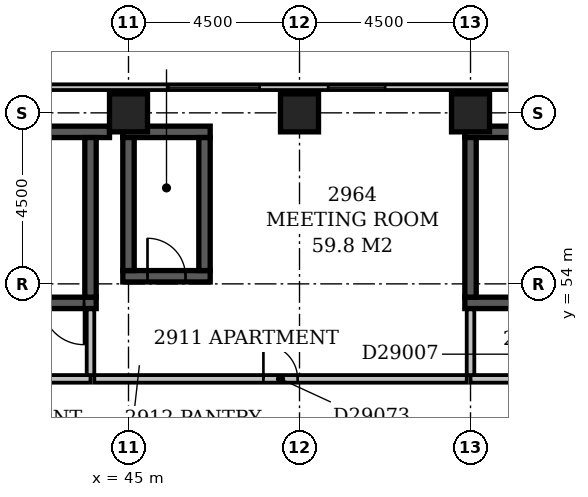
"""IFC4 building model, lengths in metres.
Left out: names, types, materials, properties, quantities, classifications, styles, units other than length and angle.
Written with IfcOpenShell. Run it as: python <this file> out.ifc"""

import sys

from ifc_helpers import new_model, si_unit, direction, frame, frame_2d, origin, origin_2d, place, context, subcontext, project, spatial, rectangle, extrude, element, fill, save


model = new_model("IFC4")
c1 = context("Model", 3, precision=1e-05, world=origin(), true_north=direction((0.0, 1.0)))
c2 = subcontext(c1, "Body", "Model", "MODEL_VIEW")
j1 = project(units=[si_unit("LENGTHUNIT", "METRE"), si_unit("PLANEANGLEUNIT", "RADIAN")], contexts=[c1])
p1 = place(None, origin())
s1 = spatial("IfcSite", under=j1, at=p1, CompositionType="ELEMENT")
p2 = place(p1, origin())
s2 = spatial("IfcBuilding", under=s1, at=p2, CompositionType="ELEMENT")
p3 = place(p2, frame((0.0, 0.0, 119.6)))
s3 = spatial("IfcBuildingStorey", under=s2, at=p3, CompositionType="ELEMENT", Elevation=119.6)
p4 = place(p3, frame((37.15, 53.5, -0.3), z_axis=(0.0, 0.0, 1.0), x_axis=(1.0, 0.0, 0.0)))
e1 = element("IfcWall", 1, at=p4, inside=s3, PredefinedType="SHEAR", context=c2, shape_type="SweptSolid", body=[
    extrude(rectangle(XDim=7.0, YDim=0.3, at=frame_2d((3.5, 0.0))), origin(), (0.0, 0.0, 1.0), 3.6),
])
p5 = place(p4, frame((5.58, 0.0, 0.3)))
e2 = element("IfcOpeningElement", 2, at=p5, cuts=e1, PredefinedType="OPENING", context=c2, shape_type="SweptSolid", body=[
    extrude(rectangle(XDim=1.1, YDim=2.1, at=frame_2d((0.55, 1.05))), frame((0.0, 0.162, 0.0), z_axis=(0.0, -1.0, 0.0), x_axis=(1.0, 0.0, 0.0)), (0.0, 0.0, 1.0), 0.324),
])
p6 = place(p3, frame((37.15, 58.0, -0.3), z_axis=(0.0, 0.0, 1.0), x_axis=(1.0, 0.0, 0.0)))
e3 = element("IfcWall", 3, at=p6, inside=s3, PredefinedType="SHEAR", context=c2, shape_type="SweptSolid", body=[
    extrude(rectangle(XDim=7.35, YDim=0.3, at=frame_2d((3.675, 0.0))), origin(), (0.0, 0.0, 1.0), 3.6),
])
p7 = place(p3, frame((44.0, 53.65, -0.3), z_axis=(0.0, 0.0, 1.0), x_axis=(0.0, 1.0, 0.0)))
e4 = element("IfcWall", 4, at=p7, inside=s3, PredefinedType="SHEAR", context=c2, shape_type="SweptSolid", body=[
    extrude(rectangle(XDim=4.2, YDim=0.3, at=frame_2d((2.1, 0.0))), origin(), (0.0, 0.0, 1.0), 3.6),
])
p8 = place(p3, frame((44.85, 54.2, -0.3), z_axis=(0.0, 0.0, 1.0), x_axis=(1.0, 0.0, 0.0)))
e5 = element("IfcWall", 5, at=p8, inside=s3, PredefinedType="SHEAR", context=c2, shape_type="SweptSolid", body=[
    extrude(rectangle(XDim=2.3, YDim=0.3, at=frame_2d((1.15, 0.0))), origin(), (0.0, 0.0, 1.0), 3.6),
])
p9 = place(p8, frame((0.65, 0.0, 0.3)))
e6 = element("IfcOpeningElement", 6, at=p9, cuts=e5, PredefinedType="OPENING", context=c2, shape_type="SweptSolid", body=[
    extrude(rectangle(XDim=1.0, YDim=2.1, at=frame_2d((0.5, 1.05))), frame((0.0, 0.162, 0.0), z_axis=(0.0, -1.0, 0.0), x_axis=(1.0, 0.0, 0.0)), (0.0, 0.0, 1.0), 0.324),
])
p10 = place(p3, frame((44.85, 58.0, -0.3), z_axis=(0.0, 0.0, 1.0), x_axis=(1.0, 0.0, 0.0)))
e7 = element("IfcWall", 7, at=p10, inside=s3, PredefinedType="SHEAR", context=c2, shape_type="SweptSolid", body=[
    extrude(rectangle(XDim=2.3, YDim=0.3, at=frame_2d((1.15, 0.0))), origin(), (0.0, 0.0, 1.0), 3.6),
])
for number, where, z_axis, x_axis in (
    (8, (45.0, 54.35, -0.3), (0.0, 0.0, 1.0), (0.0, 1.0, 0.0)),
    (9, (47.0, 54.35, -0.3), (0.0, 0.0, 1.0), (0.0, 1.0, 0.0)),
):
    element("IfcWall", number, at=place(p3, frame(where, z_axis=z_axis, x_axis=x_axis)), inside=s3, PredefinedType="SHEAR", context=c2, shape_type="SweptSolid", body=[
        extrude(rectangle(XDim=3.5, YDim=0.3, at=frame_2d((1.75, 0.0))), origin(), (0.0, 0.0, 1.0), 3.6),
    ])
p11 = place(p3, frame((53.85, 53.5, -0.3), z_axis=(0.0, 0.0, 1.0), x_axis=(1.0, 0.0, 0.0)))
e10 = element("IfcWall", 10, at=p11, inside=s3, PredefinedType="SHEAR", context=c2, shape_type="SweptSolid", body=[
    extrude(rectangle(XDim=7.0, YDim=0.3, at=frame_2d((3.5, 0.0))), origin(), (0.0, 0.0, 1.0), 3.6),
])
p12 = place(p11, frame((5.58, 0.0, 0.3)))
e11 = element("IfcOpeningElement", 11, at=p12, cuts=e10, PredefinedType="OPENING", context=c2, shape_type="SweptSolid", body=[
    extrude(rectangle(XDim=1.1, YDim=2.1, at=frame_2d((0.55, 1.05))), frame((0.0, 0.162, 0.0), z_axis=(0.0, -1.0, 0.0), x_axis=(1.0, 0.0, 0.0)), (0.0, 0.0, 1.0), 0.324),
])
p13 = place(p3, frame((53.85, 58.0, -0.3), z_axis=(0.0, 0.0, 1.0), x_axis=(1.0, 0.0, 0.0)))
e12 = element("IfcWall", 12, at=p13, inside=s3, PredefinedType="SHEAR", context=c2, shape_type="SweptSolid", body=[
    extrude(rectangle(XDim=7.0, YDim=0.3, at=frame_2d((3.5, 0.0))), origin(), (0.0, 0.0, 1.0), 3.6),
])
p14 = place(p3, frame((54.0, 53.65, -0.3), z_axis=(0.0, 0.0, 1.0), x_axis=(0.0, 1.0, 0.0)))
e13 = element("IfcWall", 13, at=p14, inside=s3, PredefinedType="SHEAR", context=c2, shape_type="SweptSolid", body=[
    extrude(rectangle(XDim=4.2, YDim=0.3, at=frame_2d((2.1, 0.0))), origin(), (0.0, 0.0, 1.0), 3.6),
])
for number, where, z_axis, x_axis in (
    (14, (45.0, 58.5, -0.3), (0.0, 0.0, 1.0), (1.0, 0.0, 0.0)),
    (15, (49.5, 58.5, -0.3), (0.0, 0.0, 1.0), (1.0, 0.0, 0.0)),
    (16, (54.0, 58.5, -0.3), (0.0, 0.0, 1.0), (1.0, 0.0, 0.0)),
):
    element("IfcColumn", number, at=place(p3, frame(where, z_axis=z_axis, x_axis=x_axis)), inside=s3, PredefinedType="COLUMN", context=c2, shape_type="SweptSolid", body=[
        extrude(rectangle(XDim=1.0, YDim=1.0, at=origin_2d()), origin(), (0.0, 0.0, 1.0), 3.6),
    ])
p15 = place(p3, frame((68.1, 59.175, 0.0), z_axis=(0.0, 0.0, 1.0), x_axis=(-1.0, 0.0, 0.0)))
e17 = element("IfcWall", 17, at=p15, inside=s3, PredefinedType="STANDARD", context=c2, shape_type="SweptSolid", body=[
    extrude(rectangle(XDim=68.85, YDim=0.15, at=frame_2d((34.425, 0.0))), origin(), (0.0, 0.0, 1.0), 2.7),
])
p16 = place(p15, frame((1.65, 0.0, 0.6)))
e18 = element("IfcOpeningElement", 18, at=p16, cuts=e17, PredefinedType="OPENING", context=c2, shape_type="SweptSolid", body=[
    extrude(rectangle(XDim=2.4, YDim=1.8, at=frame_2d((1.2, 0.9))), frame((0.0, 0.087, 0.0), z_axis=(0.0, -1.0, 0.0), x_axis=(1.0, 0.0, 0.0)), (0.0, 0.0, 1.0), 0.174),
])
p17 = place(p15, frame((6.15, 0.0, 0.6)))
e19 = element("IfcOpeningElement", 19, at=p17, cuts=e17, PredefinedType="OPENING", context=c2, shape_type="SweptSolid", body=[
    extrude(rectangle(XDim=2.4, YDim=1.8, at=frame_2d((1.2, 0.9))), frame((0.0, 0.087, 0.0), z_axis=(0.0, -1.0, 0.0), x_axis=(1.0, 0.0, 0.0)), (0.0, 0.0, 1.0), 0.174),
])
p18 = place(p15, frame((16.347, 0.0, 0.6)))
e20 = element("IfcOpeningElement", 20, at=p18, cuts=e17, PredefinedType="OPENING", context=c2, shape_type="SweptSolid", body=[
    extrude(rectangle(XDim=1.5, YDim=1.8, at=frame_2d((0.75, 0.9))), frame((0.0, 0.087, 0.0), z_axis=(0.0, -1.0, 0.0), x_axis=(1.0, 0.0, 0.0)), (0.0, 0.0, 1.0), 0.174),
])
p19 = place(p15, frame((19.65, 0.0, 0.6)))
e21 = element("IfcOpeningElement", 21, at=p19, cuts=e17, PredefinedType="OPENING", context=c2, shape_type="SweptSolid", body=[
    extrude(rectangle(XDim=2.4, YDim=1.8, at=frame_2d((1.2, 0.9))), frame((0.0, 0.087, 0.0), z_axis=(0.0, -1.0, 0.0), x_axis=(1.0, 0.0, 0.0)), (0.0, 0.0, 1.0), 0.174),
])
p20 = place(p15, frame((37.678, 0.0, 0.6)))
e22 = element("IfcOpeningElement", 22, at=p20, cuts=e17, PredefinedType="OPENING", context=c2, shape_type="SweptSolid", body=[
    extrude(rectangle(XDim=1.2, YDim=1.8, at=frame_2d((0.6, 0.9))), frame((0.0, 0.087, 0.0), z_axis=(0.0, -1.0, 0.0), x_axis=(1.0, 0.0, 0.0)), (0.0, 0.0, 1.0), 0.174),
])
p21 = place(p3, frame((37.3, 51.5, 0.0), z_axis=(0.0, 0.0, 1.0), x_axis=(1.0, 0.0, 0.0)))
e23 = element("IfcWall", 23, at=p21, inside=s3, PredefinedType="PARTITIONING", context=c2, shape_type="SweptSolid", body=[
    extrude(rectangle(XDim=6.7, YDim=0.2, at=frame_2d((3.35, 0.0))), origin(), (0.0, 0.0, 1.0), 3.3),
])
p22 = place(p21, frame((2.75, 0.0, 0.0)))
e24 = element("IfcOpeningElement", 24, at=p22, cuts=e23, PredefinedType="OPENING", context=c2, shape_type="SweptSolid", body=[
    extrude(rectangle(XDim=1.2, YDim=2.1, at=frame_2d((0.6, 1.05))), frame((0.0, 0.112, 0.0), z_axis=(0.0, -1.0, 0.0), x_axis=(1.0, 0.0, 0.0)), (0.0, 0.0, 1.0), 0.224),
])
p23 = place(p3, frame((44.0, 51.6, 0.0), z_axis=(0.0, 0.0, 1.0), x_axis=(0.0, 1.0, 0.0)))
e25 = element("IfcWall", 25, at=p23, inside=s3, PredefinedType="PARTITIONING", context=c2, shape_type="SweptSolid", body=[
    extrude(rectangle(XDim=1.73, YDim=0.2, at=frame_2d((0.865, 0.0))), origin(), (0.0, 0.0, 1.0), 3.3),
])
p24 = place(p3, frame((54.0, 51.5, 0.0), z_axis=(0.0, 0.0, 1.0), x_axis=(1.0, 0.0, 0.0)))
e26 = element("IfcWall", 26, at=p24, inside=s3, PredefinedType="PARTITIONING", context=c2, shape_type="SweptSolid", body=[
    extrude(rectangle(XDim=6.7, YDim=0.2, at=frame_2d((3.35, 0.0))), origin(), (0.0, 0.0, 1.0), 3.3),
])
p25 = place(p24, frame((2.75, 0.0, 0.0)))
e27 = element("IfcOpeningElement", 27, at=p25, cuts=e26, PredefinedType="OPENING", context=c2, shape_type="SweptSolid", body=[
    extrude(rectangle(XDim=1.2, YDim=2.1, at=frame_2d((0.6, 1.05))), frame((0.0, 0.112, 0.0), z_axis=(0.0, -1.0, 0.0), x_axis=(1.0, 0.0, 0.0)), (0.0, 0.0, 1.0), 0.224),
])
p26 = place(p3, frame((54.0, 51.6, 0.0), z_axis=(0.0, 0.0, 1.0), x_axis=(0.0, 1.0, 0.0)))
e28 = element("IfcWall", 28, at=p26, inside=s3, PredefinedType="PARTITIONING", context=c2, shape_type="SweptSolid", body=[
    extrude(rectangle(XDim=1.73, YDim=0.2, at=frame_2d((0.865, 0.0))), origin(), (0.0, 0.0, 1.0), 2.6),
])
p27 = place(p3, frame((44.1, 51.5, 0.0), z_axis=(0.0, 0.0, 1.0), x_axis=(1.0, 0.0, 0.0)))
e29 = element("IfcWall", 29, at=p27, inside=s3, PredefinedType="PARTITIONING", context=c2, shape_type="SweptSolid", body=[
    extrude(rectangle(XDim=9.8, YDim=0.2, at=frame_2d((4.9, 0.0))), origin(), (0.0, 0.0, 1.0), 3.3),
])
p28 = place(p27, frame((4.45, 0.0, 0.0)))
e30 = element("IfcOpeningElement", 30, at=p28, cuts=e29, PredefinedType="OPENING", context=c2, shape_type="SweptSolid", body=[
    extrude(rectangle(XDim=0.9, YDim=2.1, at=frame_2d((0.45, 1.05))), frame((0.0, 0.112, 0.0), z_axis=(0.0, -1.0, 0.0), x_axis=(1.0, 0.0, 0.0)), (0.0, 0.0, 1.0), 0.224),
])
p29 = place(p18, origin())
e31 = element("IfcWindow", 31, at=p29, inside=s3, PartitioningType="SINGLE_PANEL", PredefinedType="WINDOW", context=c2, shape_type="SweptSolid", body=[
    extrude(rectangle(XDim=1.5, YDim=1.8, at=frame_2d((0.75, 0.9))), frame((0.0, 0.03, 0.0), z_axis=(0.0, -1.0, 0.0), x_axis=(1.0, 0.0, 0.0)), (0.0, 0.0, 1.0), 0.06),
])
fill(e20, e31)
p30 = place(p19, origin())
e32 = element("IfcWindow", 32, at=p30, inside=s3, PartitioningType="SINGLE_PANEL", PredefinedType="WINDOW", context=c2, shape_type="SweptSolid", body=[
    extrude(rectangle(XDim=2.4, YDim=1.8, at=frame_2d((1.2, 0.9))), frame((0.0, 0.03, 0.0), z_axis=(0.0, -1.0, 0.0), x_axis=(1.0, 0.0, 0.0)), (0.0, 0.0, 1.0), 0.06),
])
fill(e21, e32)
p31 = place(p9, origin())
e33 = element("IfcDoor", 33, at=p31, inside=s3, OperationType="SINGLE_SWING_LEFT", PredefinedType="DOOR", context=c2, shape_type="SweptSolid", body=[
    extrude(rectangle(XDim=1.0, YDim=2.1, at=frame_2d((0.5, 1.05))), frame((0.0, 0.025, 0.0), z_axis=(0.0, -1.0, 0.0), x_axis=(1.0, 0.0, 0.0)), (0.0, 0.0, 1.0), 0.05),
])
fill(e6, e33)
p32 = place(p5, origin())
e34 = element("IfcDoor", 34, at=p32, inside=s3, OperationType="SINGLE_SWING_RIGHT", PredefinedType="DOOR", context=c2, shape_type="SweptSolid", body=[
    extrude(rectangle(XDim=1.1, YDim=2.1, at=frame_2d((0.55, 1.05))), frame((0.0, 0.025, 0.0), z_axis=(0.0, -1.0, 0.0), x_axis=(1.0, 0.0, 0.0)), (0.0, 0.0, 1.0), 0.05),
])
fill(e2, e34)
p33 = place(p28, origin())
e35 = element("IfcDoor", 35, at=p33, inside=s3, OperationType="SINGLE_SWING_LEFT", PredefinedType="DOOR", context=c2, shape_type="SweptSolid", body=[
    extrude(rectangle(XDim=0.9, YDim=2.1, at=frame_2d((0.45, 1.05))), frame((0.0, 0.025, 0.0), z_axis=(0.0, -1.0, 0.0), x_axis=(1.0, 0.0, 0.0)), (0.0, 0.0, 1.0), 0.05),
])
fill(e30, e35)
save(model, sys.argv[1])
